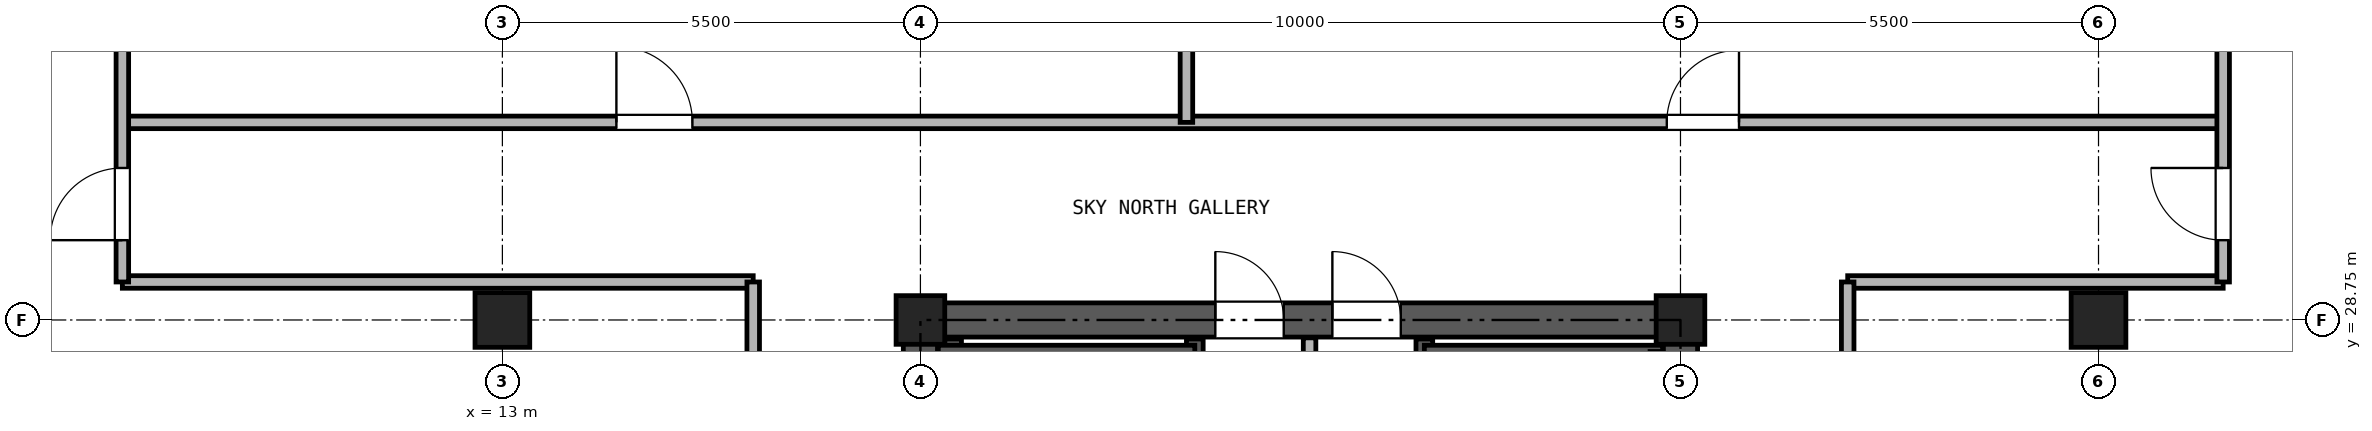
"""IFC4 building model, lengths in metres.
Left out: names, types, materials, properties, quantities, classifications, styles, units other than length and angle.
Written with IfcOpenShell. Run it as: python <this file> out.ifc"""

import sys

from ifc_helpers import new_model, si_unit, direction, frame, frame_2d, origin, origin_2d, place, context, subcontext, project, spatial, rectangle, hollow_rectangle, extrude, source, transform, mapped, element, fill, save


model = new_model("IFC4")
c1 = context("Model", 3, precision=1e-05, world=origin(), true_north=direction((0.0, 1.0)))
c2 = subcontext(c1, "Body", "Model", "MODEL_VIEW")
j1 = project(units=[si_unit("LENGTHUNIT", "METRE"), si_unit("PLANEANGLEUNIT", "RADIAN")], contexts=[c1])
p1 = place(None, origin())
s1 = spatial("IfcSite", under=j1, at=p1, CompositionType="ELEMENT")
p2 = place(p1, origin())
s2 = spatial("IfcBuilding", under=s1, at=p2, CompositionType="ELEMENT")
p3 = place(p2, frame((0.0, 0.0, 151.6)))
s3 = spatial("IfcBuildingStorey", under=s2, at=p3, CompositionType="ELEMENT", Elevation=151.6)
m1 = source(origin(), c2, "Body", "SweptSolid", [
    extrude(hollow_rectangle(XDim=0.72, YDim=0.72, WallThickness=0.04, at=origin_2d()), origin(), (0.0, 0.0, 1.0), 4.25),
])
p4 = place(p3, frame((13.0, 28.75, 0.0), z_axis=(0.0, 0.0, 1.0), x_axis=(1.0, 0.0, 0.0)))
e1 = element("IfcColumn", 1, at=p4, inside=s3, PredefinedType="COLUMN", context=c2, shape_type="MappedRepresentation", body=[
    mapped(m1, transform((0.0, 0.0, 0.0), x_axis=(1.0, 0.0, 0.0), y_axis=(0.0, 1.0, 0.0), z_axis=(0.0, 0.0, 1.0), scale=1.0)),
])
m2 = source(origin(), c2, "Body", "SweptSolid", [
    extrude(hollow_rectangle(XDim=0.64, YDim=0.64, WallThickness=0.035, at=origin_2d()), origin(), (0.0, 0.0, 1.0), 4.25),
])
for number, where, z_axis, x_axis in (
    (2, (18.5, 28.75, 0.0), (0.0, 0.0, 1.0), (1.0, 0.0, 0.0)),
    (3, (28.5, 28.75, 0.0), (0.0, 0.0, 1.0), (1.0, 0.0, 0.0)),
):
    element("IfcColumn", number, at=place(p3, frame(where, z_axis=z_axis, x_axis=x_axis)), inside=s3, PredefinedType="COLUMN", context=c2, shape_type="MappedRepresentation", body=[
        mapped(m2, transform((0.0, 0.0, 0.0), x_axis=(1.0, 0.0, 0.0), y_axis=(0.0, 1.0, 0.0), z_axis=(0.0, 0.0, 1.0), scale=1.0)),
    ])
p5 = place(p3, frame((34.0, 28.75, 0.0), z_axis=(0.0, 0.0, 1.0), x_axis=(1.0, 0.0, 0.0)))
e4 = element("IfcColumn", 4, at=p5, inside=s3, PredefinedType="COLUMN", context=c2, shape_type="MappedRepresentation", body=[
    mapped(m1, transform((0.0, 0.0, 0.0), x_axis=(1.0, 0.0, 0.0), y_axis=(0.0, 1.0, 0.0), z_axis=(0.0, 0.0, 1.0), scale=1.0)),
])
p6 = place(p3, frame((18.275, 28.75, 0.0), z_axis=(0.0, 0.0, 1.0), x_axis=(1.0, 0.0, 0.0)))
e5 = element("IfcWall", 5, at=p6, inside=s3, PredefinedType="SHEAR", context=c2, shape_type="SweptSolid", body=[
    extrude(rectangle(XDim=10.45, YDim=0.45, at=frame_2d((5.225, 0.0))), origin(), (0.0, 0.0, 1.0), 4.25),
])
p7 = place(p6, frame((4.105, 0.0, 0.0)))
e6 = element("IfcOpeningElement", 6, at=p7, cuts=e5, PredefinedType="OPENING", context=c2, shape_type="SweptSolid", body=[
    extrude(rectangle(XDim=0.9, YDim=2.05, at=frame_2d((0.45, 1.025))), frame((0.0, 0.235, 0.0), z_axis=(0.0, -1.0, 0.0), x_axis=(1.0, 0.0, 0.0)), (0.0, 0.0, 1.0), 0.47),
])
p8 = place(p6, frame((5.645, 0.0, 0.0)))
e7 = element("IfcOpeningElement", 7, at=p8, cuts=e5, PredefinedType="OPENING", context=c2, shape_type="SweptSolid", body=[
    extrude(rectangle(XDim=0.9, YDim=2.05, at=frame_2d((0.45, 1.025))), frame((0.0, 0.235, 0.0), z_axis=(0.0, -1.0, 0.0), x_axis=(1.0, 0.0, 0.0)), (0.0, 0.0, 1.0), 0.47),
])
p9 = place(p3, frame((18.5, 11.725, 0.0), z_axis=(0.0, 0.0, 1.0), x_axis=(0.0, 1.0, 0.0)))
e8 = element("IfcWall", 8, at=p9, inside=s3, PredefinedType="SHEAR", context=c2, shape_type="SweptSolid", body=[
    extrude(rectangle(XDim=16.8, YDim=0.45, at=frame_2d((8.4, 0.0))), origin(), (0.0, 0.0, 1.0), 4.25),
])
p10 = place(p9, frame((7.425, 0.0, 0.0)))
e9 = element("IfcOpeningElement", 9, at=p10, cuts=e8, PredefinedType="OPENING", context=c2, shape_type="SweptSolid", body=[
    extrude(rectangle(XDim=1.15, YDim=2.2, at=frame_2d((0.575, 1.1))), frame((0.0, 0.235, 0.0), z_axis=(0.0, -1.0, 0.0), x_axis=(1.0, 0.0, 0.0)), (0.0, 0.0, 1.0), 0.47),
])
p11 = place(p3, frame((28.5, 11.725, 0.0), z_axis=(0.0, 0.0, 1.0), x_axis=(0.0, 1.0, 0.0)))
e10 = element("IfcWall", 10, at=p11, inside=s3, PredefinedType="SHEAR", context=c2, shape_type="SweptSolid", body=[
    extrude(rectangle(XDim=16.8, YDim=0.45, at=frame_2d((8.4, 0.0))), origin(), (0.0, 0.0, 1.0), 4.25),
])
p12 = place(p11, frame((7.425, 0.0, 0.0)))
e11 = element("IfcOpeningElement", 11, at=p12, cuts=e10, PredefinedType="OPENING", context=c2, shape_type="SweptSolid", body=[
    extrude(rectangle(XDim=1.15, YDim=2.2, at=frame_2d((0.575, 1.1))), frame((0.0, 0.235, 0.0), z_axis=(0.0, -1.0, 0.0), x_axis=(1.0, 0.0, 0.0)), (0.0, 0.0, 1.0), 0.47),
])
for number, where, z_axis, x_axis in (
    (12, (18.93, 21.39, 0.0), (0.0, 0.0, 1.0), (0.0, 1.0, 0.0)),
    (13, (22.11, 21.39, 0.0), (0.0, 0.0, 1.0), (0.0, 1.0, 0.0)),
    (14, (25.13, 21.39, 0.0), (0.0, 0.0, 1.0), (0.0, 1.0, 0.0)),
):
    element("IfcWall", number, at=place(p3, frame(where, z_axis=z_axis, x_axis=x_axis)), inside=s3, PredefinedType="SOLIDWALL", context=c2, shape_type="SweptSolid", body=[
        extrude(rectangle(XDim=7.11, YDim=0.22, at=frame_2d((3.555, 0.0))), origin(), (0.0, 0.0, 1.0), 4.25),
    ])
p13 = place(p3, frame((18.735, 28.335, 0.0), z_axis=(0.0, 0.0, 1.0), x_axis=(1.0, 0.0, 0.0)))
e15 = element("IfcWall", 15, at=p13, inside=s3, PredefinedType="PARTITIONING", context=c2, shape_type="SweptSolid", body=[
    extrude(rectangle(XDim=3.375, YDim=0.165, at=frame_2d((1.688, 0.0))), origin(), (0.0, 0.0, 1.0), 4.25),
])
p14 = place(p3, frame((25.13, 28.335, 0.0), z_axis=(0.0, 0.0, 1.0), x_axis=(1.0, 0.0, 0.0)))
e16 = element("IfcWall", 16, at=p14, inside=s3, PredefinedType="PARTITIONING", context=c2, shape_type="SweptSolid", body=[
    extrude(rectangle(XDim=3.135, YDim=0.165, at=frame_2d((1.567, 0.0))), origin(), (0.0, 0.0, 1.0), 4.25),
])
p15 = place(p3, frame((28.183, 21.39, 0.0), z_axis=(0.0, 0.0, 1.0), x_axis=(0.0, 1.0, 0.0)))
e17 = element("IfcWall", 17, at=p15, inside=s3, PredefinedType="PARTITIONING", context=c2, shape_type="SweptSolid", body=[
    extrude(rectangle(XDim=6.945, YDim=0.165, at=frame_2d((3.473, 0.0))), origin(), (0.0, 0.0, 1.0), 4.25),
])
p16 = place(p3, frame((23.62, 24.4, 0.0), z_axis=(0.0, 0.0, 1.0), x_axis=(0.0, 1.0, 0.0)))
e18 = element("IfcWall", 18, at=p16, inside=s3, PredefinedType="PARTITIONING", context=c2, shape_type="SweptSolid", body=[
    extrude(rectangle(XDim=4.115, YDim=0.165, at=frame_2d((2.058, 0.0))), origin(), (0.0, 0.0, 1.0), 4.25),
])
p17 = place(p3, frame((8.0, 31.35, 0.0), z_axis=(0.0, 0.0, 1.0), x_axis=(1.0, 0.0, 0.0)))
e19 = element("IfcWall", 19, at=p17, inside=s3, PredefinedType="PARTITIONING", context=c2, shape_type="SweptSolid", body=[
    extrude(rectangle(XDim=27.64, YDim=0.165, at=frame_2d((13.82, 0.0))), origin(), (0.0, 0.0, 1.0), 4.25),
])
p18 = place(p17, frame((6.5, 0.0, 0.0)))
e20 = element("IfcOpeningElement", 20, at=p18, cuts=e19, PredefinedType="OPENING", context=c2, shape_type="SweptSolid", body=[
    extrude(rectangle(XDim=1.0, YDim=2.15, at=frame_2d((0.5, 1.075))), frame((0.0, 0.093, 0.0), z_axis=(0.0, -1.0, 0.0), x_axis=(1.0, 0.0, 0.0)), (0.0, 0.0, 1.0), 0.185),
])
p19 = place(p17, frame((20.32, 0.0, 0.0)))
e21 = element("IfcOpeningElement", 21, at=p19, cuts=e19, PredefinedType="OPENING", context=c2, shape_type="SweptSolid", body=[
    extrude(rectangle(XDim=0.95, YDim=2.15, at=frame_2d((0.475, 1.075))), frame((0.0, 0.093, 0.0), z_axis=(0.0, -1.0, 0.0), x_axis=(1.0, 0.0, 0.0)), (0.0, 0.0, 1.0), 0.185),
])
p20 = place(p3, frame((8.0, 29.25, 0.0), z_axis=(0.0, 0.0, 1.0), x_axis=(1.0, 0.0, 0.0)))
e22 = element("IfcWall", 22, at=p20, inside=s3, PredefinedType="PARTITIONING", context=c2, shape_type="SweptSolid", body=[
    extrude(rectangle(XDim=8.3, YDim=0.165, at=frame_2d((4.15, 0.0))), origin(), (0.0, 0.0, 1.0), 4.25),
])
p21 = place(p3, frame((30.7, 29.25, 0.0), z_axis=(0.0, 0.0, 1.0), x_axis=(1.0, 0.0, 0.0)))
e23 = element("IfcWall", 23, at=p21, inside=s3, PredefinedType="PARTITIONING", context=c2, shape_type="SweptSolid", body=[
    extrude(rectangle(XDim=4.94, YDim=0.165, at=frame_2d((2.47, 0.0))), origin(), (0.0, 0.0, 1.0), 4.25),
])
p22 = place(p3, frame((16.3, 10.9, 0.0), z_axis=(0.0, 0.0, 1.0), x_axis=(0.0, 1.0, 0.0)))
e24 = element("IfcWall", 24, at=p22, inside=s3, PredefinedType="PARTITIONING", context=c2, shape_type="SweptSolid", body=[
    extrude(rectangle(XDim=18.35, YDim=0.165, at=frame_2d((9.175, 0.0))), origin(), (0.0, 0.0, 1.0), 4.25),
])
p23 = place(p22, frame((4.05, 0.0, 0.0)))
e25 = element("IfcOpeningElement", 25, at=p23, cuts=e24, PredefinedType="OPENING", context=c2, shape_type="SweptSolid", body=[
    extrude(rectangle(XDim=0.95, YDim=2.15, at=frame_2d((0.475, 1.075))), frame((0.0, 0.093, 0.0), z_axis=(0.0, -1.0, 0.0), x_axis=(1.0, 0.0, 0.0)), (0.0, 0.0, 1.0), 0.185),
])
p24 = place(p22, frame((13.225, 0.0, 0.0)))
e26 = element("IfcOpeningElement", 26, at=p24, cuts=e24, PredefinedType="OPENING", context=c2, shape_type="SweptSolid", body=[
    extrude(rectangle(XDim=0.95, YDim=2.15, at=frame_2d((0.475, 1.075))), frame((0.0, 0.093, 0.0), z_axis=(0.0, -1.0, 0.0), x_axis=(1.0, 0.0, 0.0)), (0.0, 0.0, 1.0), 0.185),
])
p25 = place(p3, frame((30.7, 10.9, 0.0), z_axis=(0.0, 0.0, 1.0), x_axis=(0.0, 1.0, 0.0)))
e27 = element("IfcWall", 27, at=p25, inside=s3, PredefinedType="PARTITIONING", context=c2, shape_type="SweptSolid", body=[
    extrude(rectangle(XDim=18.35, YDim=0.165, at=frame_2d((9.175, 0.0))), origin(), (0.0, 0.0, 1.0), 4.25),
])
p26 = place(p25, frame((8.675, 0.0, 0.0)))
e28 = element("IfcOpeningElement", 28, at=p26, cuts=e27, PredefinedType="OPENING", context=c2, shape_type="SweptSolid", body=[
    extrude(rectangle(XDim=0.95, YDim=2.15, at=frame_2d((0.475, 1.075))), frame((0.0, 0.093, 0.0), z_axis=(0.0, -1.0, 0.0), x_axis=(1.0, 0.0, 0.0)), (0.0, 0.0, 1.0), 0.185),
])
p27 = place(p3, frame((8.0, 29.25, 0.0), z_axis=(0.0, 0.0, 1.0), x_axis=(0.0, 1.0, 0.0)))
e29 = element("IfcWall", 29, at=p27, inside=s3, PredefinedType="PARTITIONING", context=c2, shape_type="SweptSolid", body=[
    extrude(rectangle(XDim=5.89, YDim=0.165, at=frame_2d((2.945, 0.0))), origin(), (0.0, 0.0, 1.0), 4.25),
])
p28 = place(p27, frame((0.55, 0.0, 0.0)))
e30 = element("IfcOpeningElement", 30, at=p28, cuts=e29, PredefinedType="OPENING", context=c2, shape_type="SweptSolid", body=[
    extrude(rectangle(XDim=0.95, YDim=2.15, at=frame_2d((0.475, 1.075))), frame((0.0, 0.093, 0.0), z_axis=(0.0, -1.0, 0.0), x_axis=(1.0, 0.0, 0.0)), (0.0, 0.0, 1.0), 0.185),
])
p29 = place(p3, frame((35.64, 29.25, 0.0), z_axis=(0.0, 0.0, 1.0), x_axis=(0.0, 1.0, 0.0)))
e31 = element("IfcWall", 31, at=p29, inside=s3, PredefinedType="PARTITIONING", context=c2, shape_type="SweptSolid", body=[
    extrude(rectangle(XDim=5.89, YDim=0.165, at=frame_2d((2.945, 0.0))), origin(), (0.0, 0.0, 1.0), 4.25),
])
p30 = place(p29, frame((0.55, 0.0, 0.0)))
e32 = element("IfcOpeningElement", 32, at=p30, cuts=e31, PredefinedType="OPENING", context=c2, shape_type="SweptSolid", body=[
    extrude(rectangle(XDim=0.95, YDim=2.15, at=frame_2d((0.475, 1.075))), frame((0.0, 0.093, 0.0), z_axis=(0.0, -1.0, 0.0), x_axis=(1.0, 0.0, 0.0)), (0.0, 0.0, 1.0), 0.185),
])
p31 = place(p3, frame((22.0, 31.35, 0.0), z_axis=(0.0, 0.0, 1.0), x_axis=(0.0, 1.0, 0.0)))
e33 = element("IfcWall", 33, at=p31, inside=s3, PredefinedType="PARTITIONING", context=c2, shape_type="SweptSolid", body=[
    extrude(rectangle(XDim=3.79, YDim=0.165, at=frame_2d((1.895, 0.0))), origin(), (0.0, 0.0, 1.0), 4.25),
])
p32 = place(p7, origin())
e34 = element("IfcDoor", 34, at=p32, inside=s3, OperationType="SINGLE_SWING_LEFT", PredefinedType="DOOR", context=c2, shape_type="SweptSolid", body=[
    extrude(rectangle(XDim=0.9, YDim=2.05, at=frame_2d((0.45, 1.025))), frame((0.0, 0.025, 0.0), z_axis=(0.0, -1.0, 0.0), x_axis=(1.0, 0.0, 0.0)), (0.0, 0.0, 1.0), 0.05),
])
fill(e6, e34)
p33 = place(p8, origin())
e35 = element("IfcDoor", 35, at=p33, inside=s3, OperationType="SINGLE_SWING_LEFT", PredefinedType="DOOR", context=c2, shape_type="SweptSolid", body=[
    extrude(rectangle(XDim=0.9, YDim=2.05, at=frame_2d((0.45, 1.025))), frame((0.0, 0.025, 0.0), z_axis=(0.0, -1.0, 0.0), x_axis=(1.0, 0.0, 0.0)), (0.0, 0.0, 1.0), 0.05),
])
fill(e7, e35)
p34 = place(p18, origin())
e36 = element("IfcDoor", 36, at=p34, inside=s3, OperationType="SINGLE_SWING_LEFT", PredefinedType="DOOR", context=c2, shape_type="SweptSolid", body=[
    extrude(rectangle(XDim=1.0, YDim=2.15, at=frame_2d((0.5, 1.075))), frame((0.0, 0.025, 0.0), z_axis=(0.0, -1.0, 0.0), x_axis=(1.0, 0.0, 0.0)), (0.0, 0.0, 1.0), 0.05),
])
fill(e20, e36)
p35 = place(p19, origin())
e37 = element("IfcDoor", 37, at=p35, inside=s3, OperationType="SINGLE_SWING_RIGHT", PredefinedType="DOOR", context=c2, shape_type="SweptSolid", body=[
    extrude(rectangle(XDim=0.95, YDim=2.15, at=frame_2d((0.475, 1.075))), frame((0.0, 0.025, 0.0), z_axis=(0.0, -1.0, 0.0), x_axis=(1.0, 0.0, 0.0)), (0.0, 0.0, 1.0), 0.05),
])
fill(e21, e37)
p36 = place(p28, frame((0.95, 0.0, 0.0), z_axis=(0.0, 0.0, 1.0), x_axis=(-1.0, 0.0, 0.0)))
e38 = element("IfcDoor", 38, at=p36, inside=s3, OperationType="SINGLE_SWING_LEFT", PredefinedType="DOOR", context=c2, shape_type="SweptSolid", body=[
    extrude(rectangle(XDim=0.95, YDim=2.15, at=frame_2d((0.475, 1.075))), frame((0.0, 0.025, 0.0), z_axis=(0.0, -1.0, 0.0), x_axis=(1.0, 0.0, 0.0)), (0.0, 0.0, 1.0), 0.05),
])
fill(e30, e38)
p37 = place(p30, origin())
e39 = element("IfcDoor", 39, at=p37, inside=s3, OperationType="SINGLE_SWING_RIGHT", PredefinedType="DOOR", context=c2, shape_type="SweptSolid", body=[
    extrude(rectangle(XDim=0.95, YDim=2.15, at=frame_2d((0.475, 1.075))), frame((0.0, 0.025, 0.0), z_axis=(0.0, -1.0, 0.0), x_axis=(1.0, 0.0, 0.0)), (0.0, 0.0, 1.0), 0.05),
])
fill(e32, e39)
save(model, sys.argv[1])
